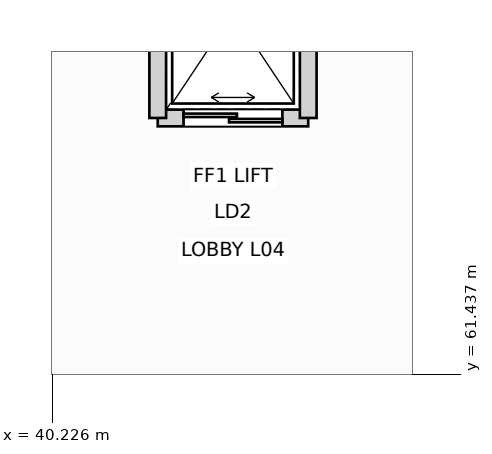
"""IFC4 building model, lengths in metres.
Left out: names, types, materials, properties, quantities, classifications, styles, units other than length and angle.
Written with IfcOpenShell. Run it as: python <this file> out.ifc"""

import sys

from ifc_helpers import new_model, si_unit, direction, frame, frame_2d, origin, place, context, subcontext, project, spatial, rectangle, extrude, element, fill, save


model = new_model("IFC4")
c1 = context("Model", 3, precision=1e-05, world=origin(), true_north=direction((0.0, 1.0)))
c2 = subcontext(c1, "Body", "Model", "MODEL_VIEW")
j1 = project(units=[si_unit("LENGTHUNIT", "METRE"), si_unit("PLANEANGLEUNIT", "RADIAN")], contexts=[c1])
p1 = place(None, origin())
s1 = spatial("IfcSite", under=j1, at=p1, CompositionType="ELEMENT")
p2 = place(p1, origin())
s2 = spatial("IfcBuilding", under=s1, at=p2, CompositionType="ELEMENT")
p3 = place(p2, frame((0.0, 0.0, 21.6)))
s3 = spatial("IfcBuildingStorey", under=s2, at=p3, CompositionType="ELEMENT", Elevation=21.6)
p4 = place(p3, frame((41.61, 64.81, 0.0), z_axis=(0.0, 0.0, 1.0), x_axis=(1.0, 0.0, 0.0)))
e1 = element("IfcWall", 1, at=p4, inside=s3, PredefinedType="PARTITIONING", context=c2, shape_type="SweptSolid", body=[
    extrude(rectangle(XDim=1.98, YDim=0.22, at=frame_2d((0.99, 0.0))), origin(), (0.0, 0.0, 1.0), 4.505),
])
p5 = place(p4, frame((0.34, 0.0, 0.0)))
e2 = element("IfcOpeningElement", 2, at=p5, cuts=e1, PredefinedType="OPENING", context=c2, shape_type="SweptSolid", body=[
    extrude(rectangle(XDim=1.3, YDim=2.2, at=frame_2d((0.65, 1.1))), frame((0.0, 0.12, 0.0), z_axis=(0.0, -1.0, 0.0), x_axis=(1.0, 0.0, 0.0)), (0.0, 0.0, 1.0), 0.24),
])
for number, where, z_axis, x_axis in (
    (3, (41.61, 64.81, 0.0), (0.0, 0.0, 1.0), (0.0, 1.0, 0.0)),
    (4, (43.59, 64.81, 0.0), (0.0, 0.0, 1.0), (0.0, 1.0, 0.0)),
):
    element("IfcWall", number, at=place(p3, frame(where, z_axis=z_axis, x_axis=x_axis)), inside=s3, PredefinedType="PARTITIONING", context=c2, shape_type="SweptSolid", body=[
        extrude(rectangle(XDim=2.78, YDim=0.22, at=frame_2d((1.39, 0.0))), origin(), (0.0, 0.0, 1.0), 4.175),
    ])
p6 = place(p5, origin())
e5 = element("IfcDoor", 5, at=p6, inside=s3, OperationType="DOUBLE_DOOR_SLIDING", PredefinedType="DOOR", context=c2, shape_type="SweptSolid", body=[
    extrude(rectangle(XDim=1.3, YDim=2.2, at=frame_2d((0.65, 1.1))), frame((0.0, 0.025, 0.0), z_axis=(0.0, -1.0, 0.0), x_axis=(1.0, 0.0, 0.0)), (0.0, 0.0, 1.0), 0.05),
])
fill(e2, e5)
save(model, sys.argv[1])
